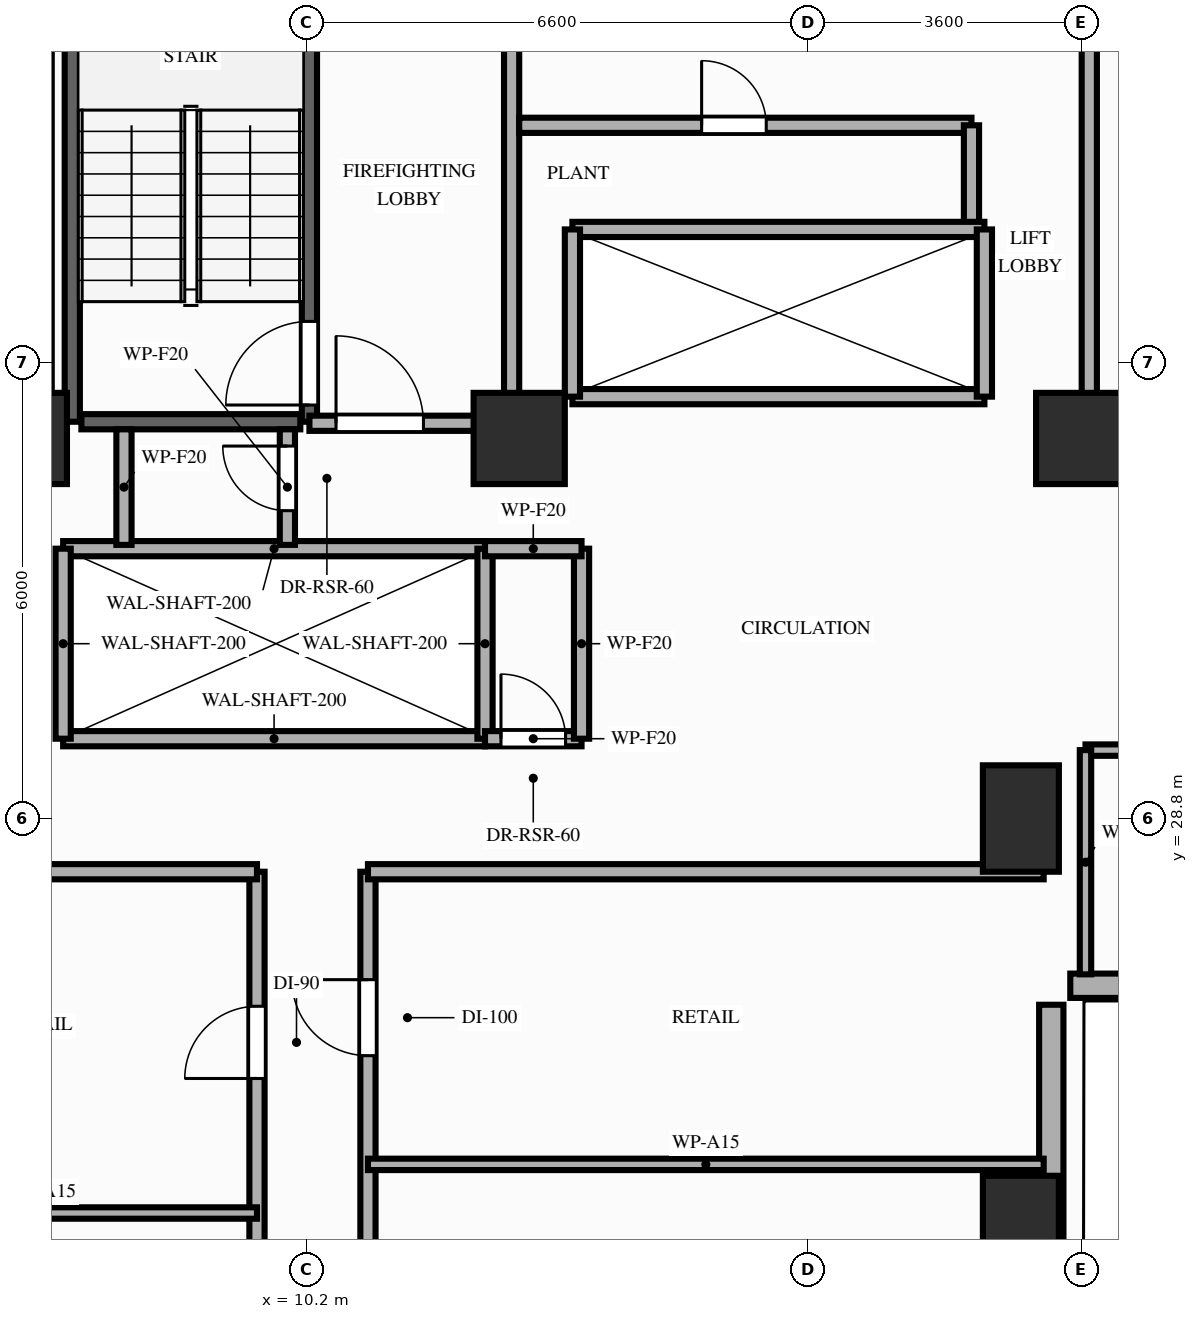
"""IFC4 building model, lengths in metres.
Left out: names, types, materials, properties, quantities, classifications, styles, units other than length and angle.
Written with IfcOpenShell. Run it as: python <this file> out.ifc"""

import sys

from ifc_helpers import new_model, si_unit, direction, frame, frame_2d, origin, origin_2d, place, context, subcontext, project, spatial, rectangle, extrude, element, fill, save


model = new_model("IFC4")
c1 = context("Model", 3, precision=1e-05, world=origin(), true_north=direction((0.0, 1.0)))
c2 = subcontext(c1, "Body", "Model", "MODEL_VIEW")
j1 = project(units=[si_unit("LENGTHUNIT", "METRE"), si_unit("PLANEANGLEUNIT", "RADIAN")], contexts=[c1])
p1 = place(None, origin())
s1 = spatial("IfcSite", under=j1, at=p1, CompositionType="ELEMENT")
p2 = place(p1, origin())
s2 = spatial("IfcBuilding", under=s1, at=p2, CompositionType="ELEMENT")
p3 = place(p2, frame((0.0, 0.0, 50.0)))
s3 = spatial("IfcBuildingStorey", under=s2, at=p3, CompositionType="ELEMENT", Elevation=50.0)
for number, where, z_axis, x_axis in (
    (1, (6.45, 33.8, 0.0), (0.0, 0.0, 1.0), (1.0, 0.0, 0.0)),
    (2, (13.0, 33.8, 0.0), (0.0, 0.0, 1.0), (1.0, 0.0, 0.0)),
    (3, (20.4, 33.8, 0.0), (0.0, 0.0, 1.0), (1.0, 0.0, 0.0)),
):
    element("IfcColumn", number, at=place(p3, frame(where, z_axis=z_axis, x_axis=x_axis)), inside=s3, PredefinedType="COLUMN", context=c2, shape_type="SweptSolid", body=[
        extrude(rectangle(XDim=1.2, YDim=1.2, at=origin_2d()), origin(), (0.0, 0.0, 1.0), 3.2),
    ])
for number, where, z_axis, x_axis in (
    (4, (19.6, 23.4, 0.0), (0.0, 0.0, 1.0), (1.0, 0.0, 0.0)),
    (5, (19.6, 28.8, 0.0), (0.0, 0.0, 1.0), (1.0, 0.0, 0.0)),
):
    element("IfcColumn", number, at=place(p3, frame(where, z_axis=z_axis, x_axis=x_axis)), inside=s3, PredefinedType="COLUMN", context=c2, shape_type="SweptSolid", body=[
        extrude(rectangle(XDim=1.0, YDim=1.4, at=origin_2d()), origin(), (0.0, 0.0, 1.0), 3.2),
    ])
p4 = place(p3, frame((20.0, 8.8, 0.0), z_axis=(0.0, 0.0, 1.0), x_axis=(0.0, 1.0, 0.0)))
e6 = element("IfcWall", 6, at=p4, inside=s3, PredefinedType="STANDARD", context=c2, shape_type="SweptSolid", body=[
    extrude(rectangle(XDim=17.55, YDim=0.32, at=frame_2d((8.775, 0.0))), origin(), (0.0, 0.0, 1.0), 2.41),
])
p5 = place(p4, frame((10.7, 0.0, 0.85)))
e7 = element("IfcOpeningElement", 7, at=p5, cuts=e6, PredefinedType="OPENING", context=c2, shape_type="SweptSolid", body=[
    extrude(rectangle(XDim=2.4, YDim=1.31, at=frame_2d((1.2, 0.655))), frame((0.0, 0.17, 0.0), z_axis=(0.0, -1.0, 0.0), x_axis=(1.0, 0.0, 0.0)), (0.0, 0.0, 1.0), 0.34),
])
p6 = place(p4, frame((5.95, 0.0, 0.85)))
e8 = element("IfcOpeningElement", 8, at=p6, cuts=e6, PredefinedType="OPENING", context=c2, shape_type="SweptSolid", body=[
    extrude(rectangle(XDim=1.1, YDim=1.31, at=frame_2d((0.55, 0.655))), frame((0.0, 0.17, 0.0), z_axis=(0.0, -1.0, 0.0), x_axis=(1.0, 0.0, 0.0)), (0.0, 0.0, 1.0), 0.34),
])
p7 = place(p3, frame((20.25, 26.6, 0.0), z_axis=(0.0, 0.0, 1.0), x_axis=(1.0, 0.0, 0.0)))
e9 = element("IfcWall", 9, at=p7, inside=s3, PredefinedType="STANDARD", context=c2, shape_type="SweptSolid", body=[
    extrude(rectangle(XDim=26.15, YDim=0.32, at=frame_2d((13.075, 0.0))), origin(), (0.0, 0.0, 1.0), 3.02),
])
p8 = place(p7, frame((1.95, 0.0, 0.85)))
e10 = element("IfcOpeningElement", 10, at=p8, cuts=e9, PredefinedType="OPENING", context=c2, shape_type="SweptSolid", body=[
    extrude(rectangle(XDim=2.4, YDim=1.8, at=frame_2d((1.2, 0.9))), frame((0.0, 0.17, 0.0), z_axis=(0.0, -1.0, 0.0), x_axis=(1.0, 0.0, 0.0)), (0.0, 0.0, 1.0), 0.34),
])
p9 = place(p7, frame((7.45, 0.0, 0.85)))
e11 = element("IfcOpeningElement", 11, at=p9, cuts=e9, PredefinedType="OPENING", context=c2, shape_type="SweptSolid", body=[
    extrude(rectangle(XDim=2.4, YDim=1.8, at=frame_2d((1.2, 0.9))), frame((0.0, 0.17, 0.0), z_axis=(0.0, -1.0, 0.0), x_axis=(1.0, 0.0, 0.0)), (0.0, 0.0, 1.0), 0.34),
])
p10 = place(p7, frame((21.95, 0.0, 0.85)))
e12 = element("IfcOpeningElement", 12, at=p10, cuts=e9, PredefinedType="OPENING", context=c2, shape_type="SweptSolid", body=[
    extrude(rectangle(XDim=2.4, YDim=1.8, at=frame_2d((1.2, 0.9))), frame((0.0, 0.17, 0.0), z_axis=(0.0, -1.0, 0.0), x_axis=(1.0, 0.0, 0.0)), (0.0, 0.0, 1.0), 0.34),
])
p11 = place(p3, frame((7.12, 34.02, 0.0), z_axis=(0.0, 0.0, 1.0), x_axis=(0.0, 1.0, 0.0)))
e13 = element("IfcWall", 13, at=p11, inside=s3, PredefinedType="SHEAR", context=c2, shape_type="SweptSolid", body=[
    extrude(rectangle(XDim=7.78, YDim=0.2, at=frame_2d((3.89, 0.0))), origin(), (0.0, 0.0, 1.0), 3.02),
])
p12 = place(p3, frame((10.24, 34.02, 0.0), z_axis=(0.0, 0.0, 1.0), x_axis=(0.0, 1.0, 0.0)))
e14 = element("IfcWall", 14, at=p12, inside=s3, PredefinedType="SHEAR", context=c2, shape_type="SweptSolid", body=[
    extrude(rectangle(XDim=7.78, YDim=0.2, at=frame_2d((3.89, 0.0))), origin(), (0.0, 0.0, 1.0), 3.02),
])
p13 = place(p12, frame((0.22, 0.0, 0.0)))
e15 = element("IfcOpeningElement", 15, at=p13, cuts=e14, PredefinedType="OPENING", context=c2, shape_type="SweptSolid", body=[
    extrude(rectangle(XDim=1.1, YDim=2.15, at=frame_2d((0.55, 1.075))), frame((0.0, 0.11, 0.0), z_axis=(0.0, -1.0, 0.0), x_axis=(1.0, 0.0, 0.0)), (0.0, 0.0, 1.0), 0.22),
])
p14 = place(p3, frame((7.24, 34.02, 0.0), z_axis=(0.0, 0.0, 1.0), x_axis=(1.0, 0.0, 0.0)))
e16 = element("IfcWall", 16, at=p14, inside=s3, PredefinedType="SHEAR", context=c2, shape_type="SweptSolid", body=[
    extrude(rectangle(XDim=2.88, YDim=0.2, at=frame_2d((1.44, 0.0))), origin(), (0.0, 0.0, 1.0), 3.02),
])
for number, where, z_axis, x_axis in (
    (17, (7.0, 29.85, 0.0), (0.0, 0.0, 1.0), (1.0, 0.0, 0.0)),
    (18, (7.0, 32.35, 0.0), (0.0, 0.0, 1.0), (1.0, 0.0, 0.0)),
):
    element("IfcWall", number, at=place(p3, frame(where, z_axis=z_axis, x_axis=x_axis)), inside=s3, PredefinedType="MOVABLE", context=c2, shape_type="SweptSolid", body=[
        extrude(rectangle(XDim=5.55, YDim=0.2, at=frame_2d((2.775, 0.0))), origin(), (0.0, 0.0, 1.0), 3.02),
    ])
for number, where, z_axis, x_axis in (
    (19, (7.0, 29.85, 0.0), (0.0, 0.0, 1.0), (0.0, 1.0, 0.0)),
    (20, (12.55, 29.85, 0.0), (0.0, 0.0, 1.0), (0.0, 1.0, 0.0)),
):
    element("IfcWall", number, at=place(p3, frame(where, z_axis=z_axis, x_axis=x_axis)), inside=s3, PredefinedType="MOVABLE", context=c2, shape_type="SweptSolid", body=[
        extrude(rectangle(XDim=2.5, YDim=0.2, at=frame_2d((1.25, 0.0))), origin(), (0.0, 0.0, 1.0), 3.02),
    ])
p15 = place(p3, frame((12.9, 34.0, 0.0), z_axis=(0.0, 0.0, 1.0), x_axis=(0.0, 1.0, 0.0)))
e21 = element("IfcWall", 21, at=p15, inside=s3, PredefinedType="PARTITIONING", context=c2, shape_type="SweptSolid", body=[
    extrude(rectangle(XDim=5.45, YDim=0.2, at=frame_2d((2.725, 0.0))), origin(), (0.0, 0.0, 1.0), 2.41),
])
p16 = place(p3, frame((10.24, 34.0, 0.0), z_axis=(0.0, 0.0, 1.0), x_axis=(1.0, 0.0, 0.0)))
e22 = element("IfcWall", 22, at=p16, inside=s3, PredefinedType="PARTITIONING", context=c2, shape_type="SweptSolid", body=[
    extrude(rectangle(XDim=2.66, YDim=0.2, at=frame_2d((1.33, 0.0))), origin(), (0.0, 0.0, 1.0), 2.41),
])
p17 = place(p16, frame((0.35, 0.0, 0.0)))
e23 = element("IfcOpeningElement", 23, at=p17, cuts=e22, PredefinedType="OPENING", context=c2, shape_type="SweptSolid", body=[
    extrude(rectangle(XDim=1.15, YDim=2.15, at=frame_2d((0.575, 1.075))), frame((0.0, 0.11, 0.0), z_axis=(0.0, -1.0, 0.0), x_axis=(1.0, 0.0, 0.0)), (0.0, 0.0, 1.0), 0.22),
])
p18 = place(p3, frame((20.5, 34.0, 0.0), z_axis=(0.0, 0.0, 1.0), x_axis=(0.0, 1.0, 0.0)))
e24 = element("IfcWall", 24, at=p18, inside=s3, PredefinedType="PARTITIONING", context=c2, shape_type="SweptSolid", body=[
    extrude(rectangle(XDim=5.45, YDim=0.2, at=frame_2d((2.725, 0.0))), origin(), (0.0, 0.0, 1.0), 2.41),
])
p19 = place(p3, frame((20.5, 34.0, 0.0), z_axis=(0.0, 0.0, 1.0), x_axis=(1.0, 0.0, 0.0)))
e25 = element("IfcWall", 25, at=p19, inside=s3, PredefinedType="PARTITIONING", context=c2, shape_type="SweptSolid", body=[
    extrude(rectangle(XDim=2.6, YDim=0.2, at=frame_2d((1.3, 0.0))), origin(), (0.0, 0.0, 1.0), 2.41),
])
p20 = place(p19, frame((1.05, 0.0, 0.0)))
e26 = element("IfcOpeningElement", 26, at=p20, cuts=e25, PredefinedType="OPENING", context=c2, shape_type="SweptSolid", body=[
    extrude(rectangle(XDim=1.15, YDim=2.15, at=frame_2d((0.575, 1.075))), frame((0.0, 0.11, 0.0), z_axis=(0.0, -1.0, 0.0), x_axis=(1.0, 0.0, 0.0)), (0.0, 0.0, 1.0), 0.22),
])
p21 = place(p3, frame((12.55, 29.85, 0.0), z_axis=(0.0, 0.0, 1.0), x_axis=(1.0, 0.0, 0.0)))
e27 = element("IfcWall", 27, at=p21, inside=s3, PredefinedType="PARTITIONING", context=c2, shape_type="SweptSolid", body=[
    extrude(rectangle(XDim=1.27, YDim=0.2, at=frame_2d((0.635, 0.0))), origin(), (0.0, 0.0, 1.0), 3.02),
])
p22 = place(p21, frame((0.21, 0.0, 0.0)))
e28 = element("IfcOpeningElement", 28, at=p22, cuts=e27, PredefinedType="OPENING", context=c2, shape_type="SweptSolid", body=[
    extrude(rectangle(XDim=0.85, YDim=2.05, at=frame_2d((0.425, 1.025))), frame((0.0, 0.11, 0.0), z_axis=(0.0, -1.0, 0.0), x_axis=(1.0, 0.0, 0.0)), (0.0, 0.0, 1.0), 0.22),
])
p23 = place(p3, frame((13.82, 29.85, 0.0), z_axis=(0.0, 0.0, 1.0), x_axis=(0.0, 1.0, 0.0)))
e29 = element("IfcWall", 29, at=p23, inside=s3, PredefinedType="PARTITIONING", context=c2, shape_type="SweptSolid", body=[
    extrude(rectangle(XDim=2.5, YDim=0.2, at=frame_2d((1.25, 0.0))), origin(), (0.0, 0.0, 1.0), 3.02),
])
p24 = place(p3, frame((12.55, 32.35, 0.0), z_axis=(0.0, 0.0, 1.0), x_axis=(1.0, 0.0, 0.0)))
e30 = element("IfcWall", 30, at=p24, inside=s3, PredefinedType="PARTITIONING", context=c2, shape_type="SweptSolid", body=[
    extrude(rectangle(XDim=1.27, YDim=0.2, at=frame_2d((0.635, 0.0))), origin(), (0.0, 0.0, 1.0), 3.02),
])
p25 = place(p3, frame((7.8, 32.4, 0.0), z_axis=(0.0, 0.0, 1.0), x_axis=(0.0, 1.0, 0.0)))
e31 = element("IfcWall", 31, at=p25, inside=s3, PredefinedType="PARTITIONING", context=c2, shape_type="SweptSolid", body=[
    extrude(rectangle(XDim=1.52, YDim=0.2, at=frame_2d((0.76, 0.0))), origin(), (0.0, 0.0, 1.0), 2.41),
])
p26 = place(p3, frame((9.95, 32.4, 0.0), z_axis=(0.0, 0.0, 1.0), x_axis=(0.0, 1.0, 0.0)))
e32 = element("IfcWall", 32, at=p26, inside=s3, PredefinedType="PARTITIONING", context=c2, shape_type="SweptSolid", body=[
    extrude(rectangle(XDim=1.52, YDim=0.2, at=frame_2d((0.76, 0.0))), origin(), (0.0, 0.0, 1.0), 2.41),
])
p27 = place(p26, frame((0.45, 0.0, 0.0)))
e33 = element("IfcOpeningElement", 33, at=p27, cuts=e32, PredefinedType="OPENING", context=c2, shape_type="SweptSolid", body=[
    extrude(rectangle(XDim=0.85, YDim=2.05, at=frame_2d((0.425, 1.025))), frame((0.0, 0.11, 0.0), z_axis=(0.0, -1.0, 0.0), x_axis=(1.0, 0.0, 0.0)), (0.0, 0.0, 1.0), 0.22),
])
p28 = place(p3, frame((13.0, 37.92, 0.0), z_axis=(0.0, 0.0, 1.0), x_axis=(1.0, 0.0, 0.0)))
e34 = element("IfcWall", 34, at=p28, inside=s3, PredefinedType="PARTITIONING", context=c2, shape_type="SweptSolid", body=[
    extrude(rectangle(XDim=5.95, YDim=0.2, at=frame_2d((2.975, 0.0))), origin(), (0.0, 0.0, 1.0), 3.02),
])
p29 = place(p28, frame((2.4, 0.0, 0.0)))
e35 = element("IfcOpeningElement", 35, at=p29, cuts=e34, PredefinedType="OPENING", context=c2, shape_type="SweptSolid", body=[
    extrude(rectangle(XDim=0.85, YDim=2.05, at=frame_2d((0.425, 1.025))), frame((0.0, 0.11, 0.0), z_axis=(0.0, -1.0, 0.0), x_axis=(1.0, 0.0, 0.0)), (0.0, 0.0, 1.0), 0.22),
])
p30 = place(p3, frame((18.95, 36.6, 0.0), z_axis=(0.0, 0.0, 1.0), x_axis=(0.0, 1.0, 0.0)))
e36 = element("IfcWall", 36, at=p30, inside=s3, PredefinedType="PARTITIONING", context=c2, shape_type="SweptSolid", body=[
    extrude(rectangle(XDim=1.32, YDim=0.2, at=frame_2d((0.66, 0.0))), origin(), (0.0, 0.0, 1.0), 3.02),
])
for number, where, z_axis, x_axis in (
    (37, (13.7, 34.35, 0.0), (0.0, 0.0, 1.0), (1.0, 0.0, 0.0)),
    (38, (13.7, 36.55, 0.0), (0.0, 0.0, 1.0), (1.0, 0.0, 0.0)),
):
    element("IfcWall", number, at=place(p3, frame(where, z_axis=z_axis, x_axis=x_axis)), inside=s3, PredefinedType="MOVABLE", context=c2, shape_type="SweptSolid", body=[
        extrude(rectangle(XDim=5.42, YDim=0.2, at=frame_2d((2.71, 0.0))), origin(), (0.0, 0.0, 1.0), 3.02),
    ])
for number, where, z_axis, x_axis in (
    (39, (13.7, 34.35, 0.0), (0.0, 0.0, 1.0), (0.0, 1.0, 0.0)),
    (40, (19.12, 34.35, 0.0), (0.0, 0.0, 1.0), (0.0, 1.0, 0.0)),
):
    element("IfcWall", number, at=place(p3, frame(where, z_axis=z_axis, x_axis=x_axis)), inside=s3, PredefinedType="MOVABLE", context=c2, shape_type="SweptSolid", body=[
        extrude(rectangle(XDim=2.2, YDim=0.2, at=frame_2d((1.1, 0.0))), origin(), (0.0, 0.0, 1.0), 3.02),
    ])
p31 = place(p3, frame((9.55, 14.5, 0.0), z_axis=(0.0, 0.0, 1.0), x_axis=(0.0, 1.0, 0.0)))
e41 = element("IfcWall", 41, at=p31, inside=s3, PredefinedType="PARTITIONING", context=c2, shape_type="SweptSolid", body=[
    extrude(rectangle(XDim=13.6, YDim=0.2, at=frame_2d((6.8, 0.0))), origin(), (0.0, 0.0, 1.0), 2.41),
])
p32 = place(p31, frame((2.17, 0.0, 0.0)))
e42 = element("IfcOpeningElement", 42, at=p32, cuts=e41, PredefinedType="OPENING", context=c2, shape_type="SweptSolid", body=[
    extrude(rectangle(XDim=0.95, YDim=2.15, at=frame_2d((0.475, 1.075))), frame((0.0, 0.11, 0.0), z_axis=(0.0, -1.0, 0.0), x_axis=(1.0, 0.0, 0.0)), (0.0, 0.0, 1.0), 0.22),
])
p33 = place(p31, frame((6.72, 0.0, 0.0)))
e43 = element("IfcOpeningElement", 43, at=p33, cuts=e41, PredefinedType="OPENING", context=c2, shape_type="SweptSolid", body=[
    extrude(rectangle(XDim=0.95, YDim=2.15, at=frame_2d((0.475, 1.075))), frame((0.0, 0.11, 0.0), z_axis=(0.0, -1.0, 0.0), x_axis=(1.0, 0.0, 0.0)), (0.0, 0.0, 1.0), 0.22),
])
p34 = place(p31, frame((10.88, 0.0, 0.0)))
e44 = element("IfcOpeningElement", 44, at=p34, cuts=e41, PredefinedType="OPENING", context=c2, shape_type="SweptSolid", body=[
    extrude(rectangle(XDim=0.95, YDim=2.15, at=frame_2d((0.475, 1.075))), frame((0.0, 0.11, 0.0), z_axis=(0.0, -1.0, 0.0), x_axis=(1.0, 0.0, 0.0)), (0.0, 0.0, 1.0), 0.22),
])
p35 = place(p3, frame((11.01, 14.5, 0.0), z_axis=(0.0, 0.0, 1.0), x_axis=(0.0, 1.0, 0.0)))
e45 = element("IfcWall", 45, at=p35, inside=s3, PredefinedType="PARTITIONING", context=c2, shape_type="SweptSolid", body=[
    extrude(rectangle(XDim=13.6, YDim=0.2, at=frame_2d((6.8, 0.0))), origin(), (0.0, 0.0, 1.0), 2.41),
])
p36 = place(p35, frame((0.45, 0.0, 0.0)))
e46 = element("IfcOpeningElement", 46, at=p36, cuts=e45, PredefinedType="OPENING", context=c2, shape_type="SweptSolid", body=[
    extrude(rectangle(XDim=0.85, YDim=2.1, at=frame_2d((0.425, 1.05))), frame((0.0, 0.11, 0.0), z_axis=(0.0, -1.0, 0.0), x_axis=(1.0, 0.0, 0.0)), (0.0, 0.0, 1.0), 0.22),
])
p37 = place(p35, frame((1.93, 0.0, 0.0)))
e47 = element("IfcOpeningElement", 47, at=p37, cuts=e45, PredefinedType="OPENING", context=c2, shape_type="SweptSolid", body=[
    extrude(rectangle(XDim=0.95, YDim=2.1, at=frame_2d((0.475, 1.05))), frame((0.0, 0.11, 0.0), z_axis=(0.0, -1.0, 0.0), x_axis=(1.0, 0.0, 0.0)), (0.0, 0.0, 1.0), 0.22),
])
p38 = place(p35, frame((5.98, 0.0, 0.0)))
e48 = element("IfcOpeningElement", 48, at=p38, cuts=e45, PredefinedType="OPENING", context=c2, shape_type="SweptSolid", body=[
    extrude(rectangle(XDim=1.0, YDim=2.15, at=frame_2d((0.5, 1.075))), frame((0.0, 0.11, 0.0), z_axis=(0.0, -1.0, 0.0), x_axis=(1.0, 0.0, 0.0)), (0.0, 0.0, 1.0), 0.22),
])
p39 = place(p35, frame((11.18, 0.0, 0.0)))
e49 = element("IfcOpeningElement", 49, at=p39, cuts=e45, PredefinedType="OPENING", context=c2, shape_type="SweptSolid", body=[
    extrude(rectangle(XDim=1.0, YDim=2.15, at=frame_2d((0.5, 1.075))), frame((0.0, 0.11, 0.0), z_axis=(0.0, -1.0, 0.0), x_axis=(1.0, 0.0, 0.0)), (0.0, 0.0, 1.0), 0.22),
])
p40 = place(p3, frame((3.9, 28.1, 0.0), z_axis=(0.0, 0.0, 1.0), x_axis=(1.0, 0.0, 0.0)))
e50 = element("IfcWall", 50, at=p40, inside=s3, PredefinedType="PARTITIONING", context=c2, shape_type="SweptSolid", body=[
    extrude(rectangle(XDim=5.65, YDim=0.2, at=frame_2d((2.825, 0.0))), origin(), (0.0, 0.0, 1.0), 2.41),
])
p41 = place(p3, frame((11.01, 28.1, 0.0), z_axis=(0.0, 0.0, 1.0), x_axis=(1.0, 0.0, 0.0)))
e51 = element("IfcWall", 51, at=p41, inside=s3, PredefinedType="PARTITIONING", context=c2, shape_type="SweptSolid", body=[
    extrude(rectangle(XDim=8.89, YDim=0.2, at=frame_2d((4.445, 0.0))), origin(), (0.0, 0.0, 1.0), 2.41),
])
p42 = place(p3, frame((20.45, 29.7, 0.0), z_axis=(0.0, 0.0, 1.0), x_axis=(1.0, 0.0, 0.0)))
e52 = element("IfcWall", 52, at=p42, inside=s3, PredefinedType="PARTITIONING", context=c2, shape_type="SweptSolid", body=[
    extrude(rectangle(XDim=6.7, YDim=0.15, at=frame_2d((3.35, 0.0))), origin(), (0.0, 0.0, 1.0), 3.02),
])
p43 = place(p42, frame((2.8, 0.0, 0.0)))
e53 = element("IfcOpeningElement", 53, at=p43, cuts=e52, PredefinedType="OPENING", context=c2, shape_type="SweptSolid", body=[
    extrude(rectangle(XDim=0.95, YDim=2.15, at=frame_2d((0.475, 1.075))), frame((0.0, 0.085, 0.0), z_axis=(0.0, -1.0, 0.0), x_axis=(1.0, 0.0, 0.0)), (0.0, 0.0, 1.0), 0.17),
])
p44 = place(p3, frame((20.45, 26.75, 0.0), z_axis=(0.0, 0.0, 1.0), x_axis=(0.0, 1.0, 0.0)))
e54 = element("IfcWall", 54, at=p44, inside=s3, PredefinedType="PARTITIONING", context=c2, shape_type="SweptSolid", body=[
    extrude(rectangle(XDim=2.95, YDim=0.15, at=frame_2d((1.475, 0.0))), origin(), (0.0, 0.0, 1.0), 2.41),
])
p45 = place(p3, frame((3.9, 23.61, 0.0), z_axis=(0.0, 0.0, 1.0), x_axis=(1.0, 0.0, 0.0)))
e55 = element("IfcWall", 55, at=p45, inside=s3, PredefinedType="PARTITIONING", context=c2, shape_type="SweptSolid", body=[
    extrude(rectangle(XDim=5.65, YDim=0.15, at=frame_2d((2.825, 0.0))), origin(), (0.0, 0.0, 1.0), 2.41),
])
p46 = place(p3, frame((11.01, 24.25, 0.0), z_axis=(0.0, 0.0, 1.0), x_axis=(1.0, 0.0, 0.0)))
e56 = element("IfcWall", 56, at=p46, inside=s3, PredefinedType="PARTITIONING", context=c2, shape_type="SweptSolid", body=[
    extrude(rectangle(XDim=8.89, YDim=0.15, at=frame_2d((4.445, 0.0))), origin(), (0.0, 0.0, 1.0), 2.41),
])
p47 = place(p13, origin())
e57 = element("IfcDoor", 57, at=p47, inside=s3, OperationType="SINGLE_SWING_LEFT", PredefinedType="DOOR", context=c2, shape_type="SweptSolid", body=[
    extrude(rectangle(XDim=1.1, YDim=2.15, at=frame_2d((0.55, 1.075))), frame((0.0, 0.025, 0.0), z_axis=(0.0, -1.0, 0.0), x_axis=(1.0, 0.0, 0.0)), (0.0, 0.0, 1.0), 0.05),
])
fill(e15, e57)
p48 = place(p17, origin())
e58 = element("IfcDoor", 58, at=p48, inside=s3, OperationType="SINGLE_SWING_LEFT", PredefinedType="DOOR", context=c2, shape_type="SweptSolid", body=[
    extrude(rectangle(XDim=1.15, YDim=2.15, at=frame_2d((0.575, 1.075))), frame((0.0, 0.025, 0.0), z_axis=(0.0, -1.0, 0.0), x_axis=(1.0, 0.0, 0.0)), (0.0, 0.0, 1.0), 0.05),
])
fill(e23, e58)
p49 = place(p22, origin())
e59 = element("IfcDoor", 59, at=p49, inside=s3, OperationType="SINGLE_SWING_LEFT", PredefinedType="DOOR", context=c2, shape_type="SweptSolid", body=[
    extrude(rectangle(XDim=0.85, YDim=2.05, at=frame_2d((0.425, 1.025))), frame((0.0, 0.025, 0.0), z_axis=(0.0, -1.0, 0.0), x_axis=(1.0, 0.0, 0.0)), (0.0, 0.0, 1.0), 0.05),
])
fill(e28, e59)
p50 = place(p27, origin())
e60 = element("IfcDoor", 60, at=p50, inside=s3, OperationType="SINGLE_SWING_RIGHT", PredefinedType="DOOR", context=c2, shape_type="SweptSolid", body=[
    extrude(rectangle(XDim=0.85, YDim=2.05, at=frame_2d((0.425, 1.025))), frame((0.0, 0.025, 0.0), z_axis=(0.0, -1.0, 0.0), x_axis=(1.0, 0.0, 0.0)), (0.0, 0.0, 1.0), 0.05),
])
fill(e33, e60)
p51 = place(p29, origin())
e61 = element("IfcDoor", 61, at=p51, inside=s3, OperationType="SINGLE_SWING_LEFT", PredefinedType="DOOR", context=c2, shape_type="SweptSolid", body=[
    extrude(rectangle(XDim=0.85, YDim=2.05, at=frame_2d((0.425, 1.025))), frame((0.0, 0.025, 0.0), z_axis=(0.0, -1.0, 0.0), x_axis=(1.0, 0.0, 0.0)), (0.0, 0.0, 1.0), 0.05),
])
fill(e35, e61)
p52 = place(p34, origin())
e62 = element("IfcDoor", 62, at=p52, inside=s3, OperationType="SINGLE_SWING_LEFT", PredefinedType="DOOR", context=c2, shape_type="SweptSolid", body=[
    extrude(rectangle(XDim=0.95, YDim=2.15, at=frame_2d((0.475, 1.075))), frame((0.0, 0.025, 0.0), z_axis=(0.0, -1.0, 0.0), x_axis=(1.0, 0.0, 0.0)), (0.0, 0.0, 1.0), 0.05),
])
fill(e44, e62)
p53 = place(p39, origin())
e63 = element("IfcDoor", 63, at=p53, inside=s3, OperationType="SINGLE_SWING_RIGHT", PredefinedType="DOOR", context=c2, shape_type="SweptSolid", body=[
    extrude(rectangle(XDim=1.0, YDim=2.15, at=frame_2d((0.5, 1.075))), frame((0.0, 0.025, 0.0), z_axis=(0.0, -1.0, 0.0), x_axis=(1.0, 0.0, 0.0)), (0.0, 0.0, 1.0), 0.05),
])
fill(e49, e63)
save(model, sys.argv[1])
